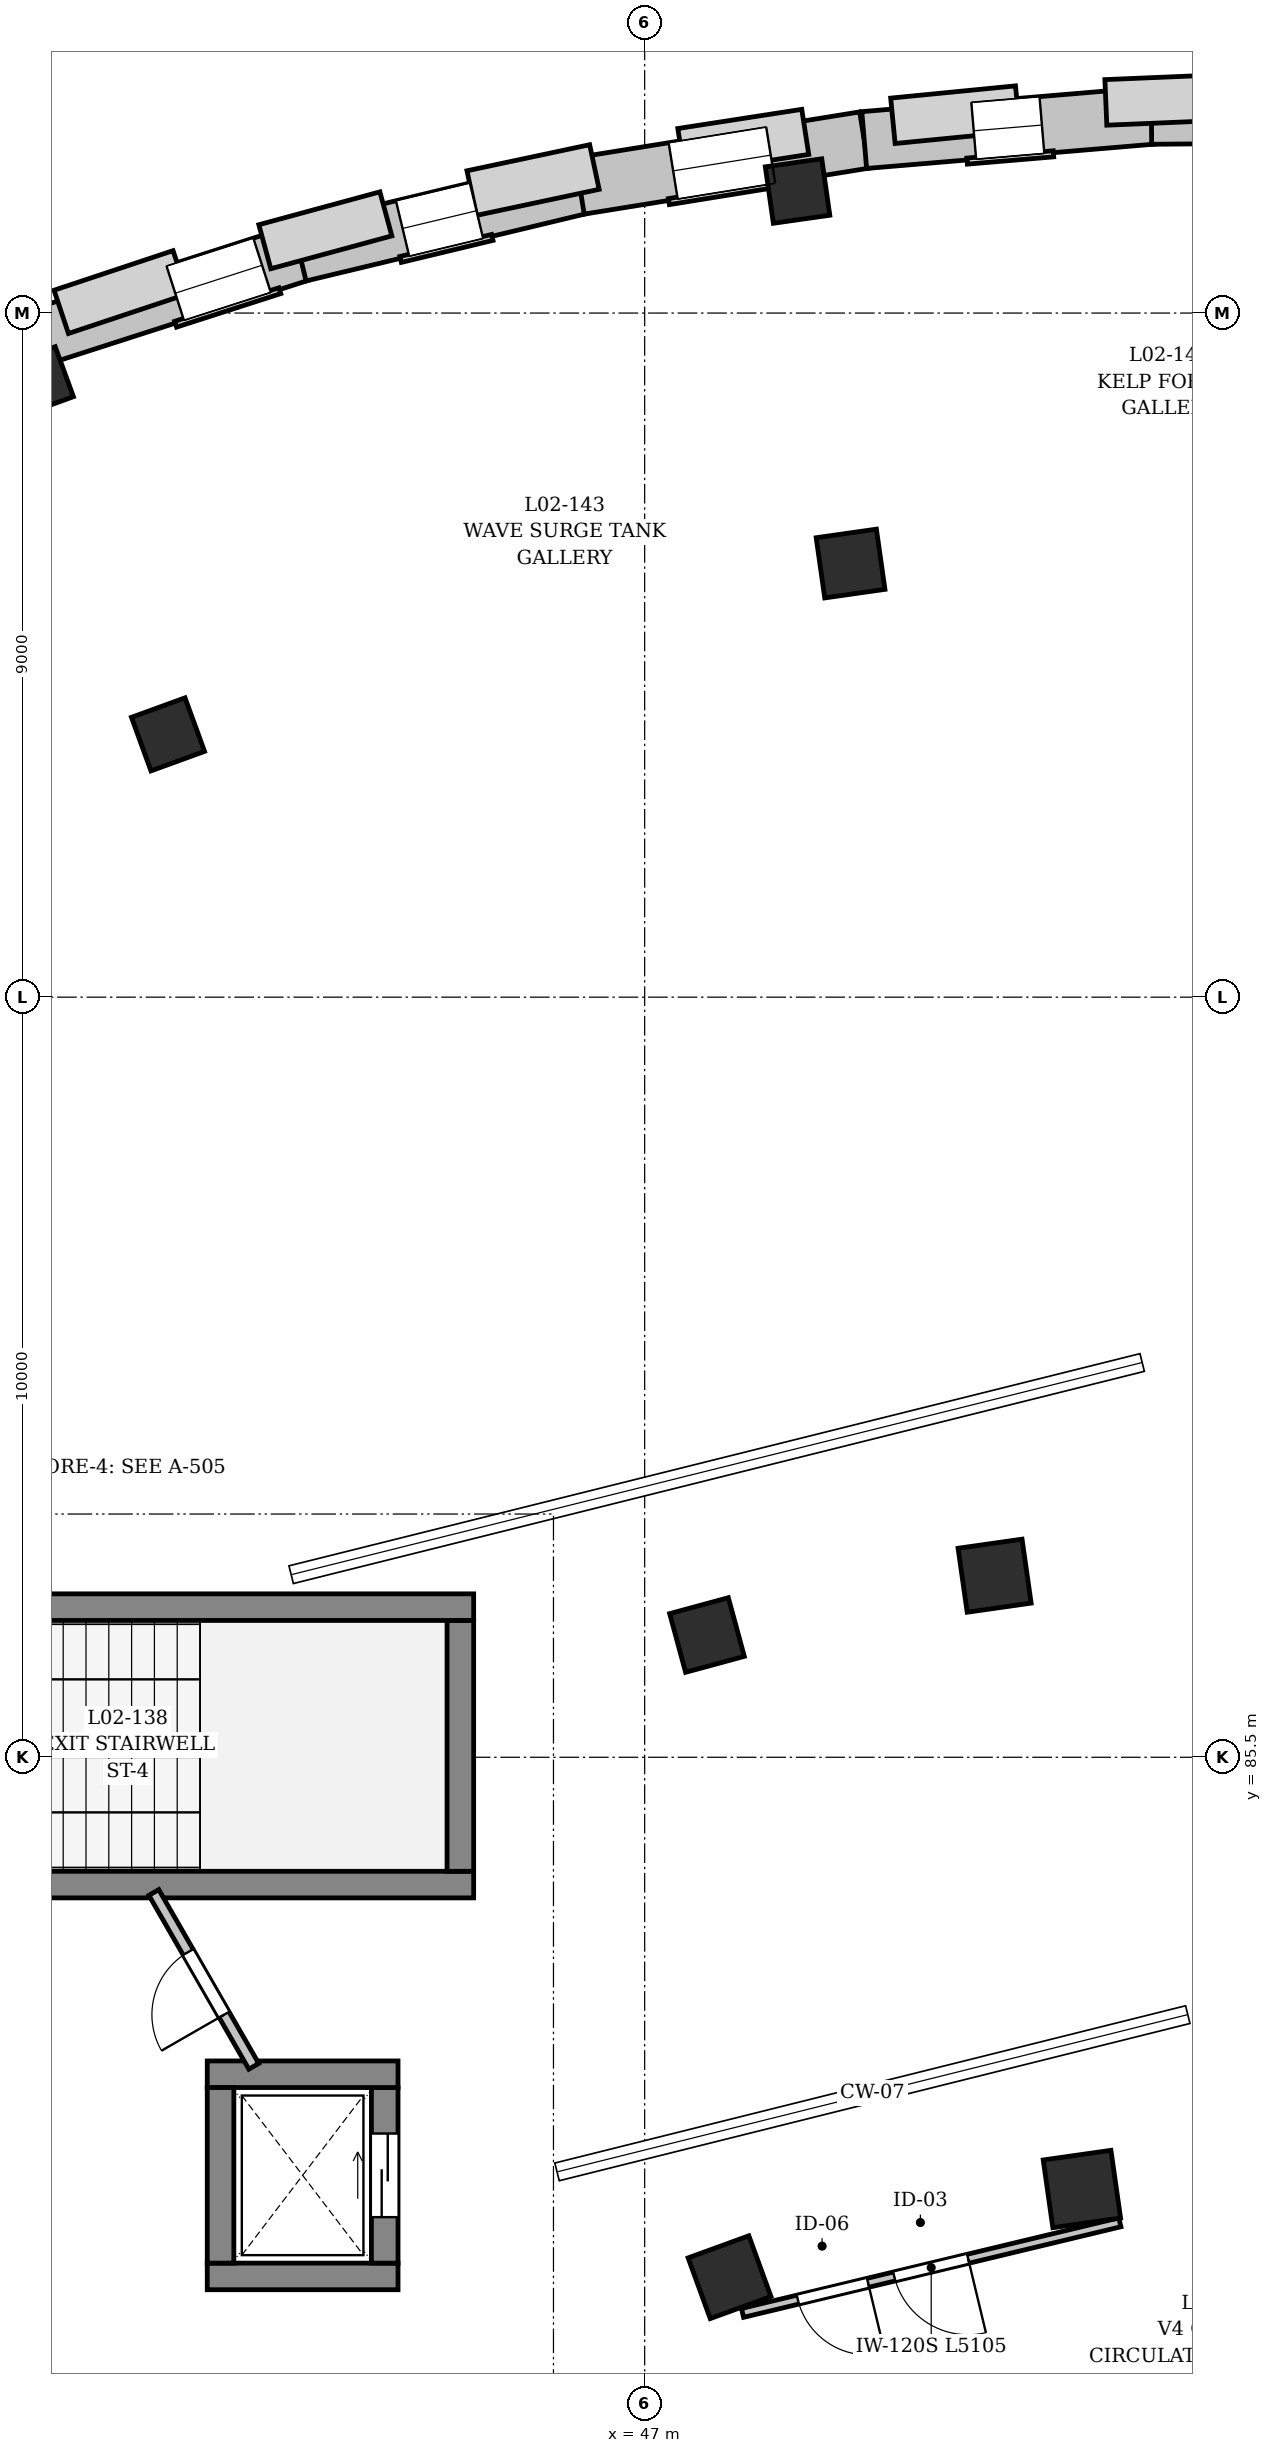
"""IFC4 building model, lengths in metres.
Left out: names, types, materials, properties, quantities, classifications, styles, units other than length and angle.
Written with IfcOpenShell. Run it as: python <this file> out.ifc"""

import sys

from ifc_helpers import new_model, si_unit, direction, frame, frame_2d, origin, origin_2d, place, context, subcontext, project, spatial, rectangle, extrude, element, fill, save


model = new_model("IFC4")
c1 = context("Model", 3, precision=1e-05, world=origin(), true_north=direction((0.0, 1.0)))
c2 = subcontext(c1, "Body", "Model", "MODEL_VIEW")
j1 = project(units=[si_unit("LENGTHUNIT", "METRE"), si_unit("PLANEANGLEUNIT", "RADIAN")], contexts=[c1])
p1 = place(None, origin())
s1 = spatial("IfcSite", under=j1, at=p1, CompositionType="ELEMENT")
p2 = place(p1, origin())
s2 = spatial("IfcBuilding", under=s1, at=p2, CompositionType="ELEMENT")
p3 = place(p2, frame((0.0, 0.0, 5.4)))
s3 = spatial("IfcBuildingStorey", under=s2, at=p3, CompositionType="ELEMENT", Elevation=5.4)
p4 = place(p3, frame((52.752, 79.82, 0.0), z_axis=(0.0, 0.0, 1.0), x_axis=(-0.140901231938, 0.990023657717, 0.0)))
e1 = element("IfcColumn", 1, at=p4, inside=s3, PredefinedType="COLUMN", context=c2, shape_type="SweptSolid", body=[
    extrude(rectangle(XDim=0.9, YDim=0.9, at=origin_2d()), origin(), (0.0, 0.0, 1.0), 4.5),
])
p5 = place(p3, frame((51.604, 87.889, 0.0), z_axis=(0.0, 0.0, 1.0), x_axis=(-0.140901231938, 0.990023657717, 0.0)))
e2 = element("IfcColumn", 2, at=p5, inside=s3, PredefinedType="COLUMN", context=c2, shape_type="SweptSolid", body=[
    extrude(rectangle(XDim=0.85, YDim=0.85, at=origin_2d()), origin(), (0.0, 0.0, 1.0), 4.5),
])
p6 = place(p3, frame((49.709, 101.205, 0.0), z_axis=(0.0, 0.0, 1.0), x_axis=(-0.140901231938, 0.990023657717, 0.0)))
e3 = element("IfcColumn", 3, at=p6, inside=s3, PredefinedType="COLUMN", context=c2, shape_type="SweptSolid", body=[
    extrude(rectangle(XDim=0.8, YDim=0.8, at=origin_2d()), origin(), (0.0, 0.0, 1.0), 4.5),
])
p7 = place(p3, frame((49.011, 106.105, 0.0), z_axis=(0.0, 0.0, 1.0), x_axis=(-0.140901231938, 0.990023657717, 0.0)))
e4 = element("IfcColumn", 4, at=p7, inside=s3, PredefinedType="COLUMN", context=c2, shape_type="SweptSolid", body=[
    extrude(rectangle(XDim=0.75, YDim=0.75, at=origin_2d()), origin(), (0.0, 0.0, 1.0), 4.5),
])
p8 = place(p3, frame((48.116, 78.66, 0.0), z_axis=(0.0, 0.0, 1.0), x_axis=(-0.342020143326, 0.939692620786, 0.0)))
e5 = element("IfcColumn", 5, at=p8, inside=s3, PredefinedType="COLUMN", context=c2, shape_type="SweptSolid", body=[
    extrude(rectangle(XDim=0.85, YDim=0.85, at=origin_2d()), origin(), (0.0, 0.0, 1.0), 4.5),
])
p9 = place(p3, frame((47.82, 87.108, 0.0), z_axis=(0.0, 0.0, 1.0), x_axis=(-0.262189178641, 0.965016494472, 0.0)))
e6 = element("IfcColumn", 6, at=p9, inside=s3, PredefinedType="COLUMN", context=c2, shape_type="SweptSolid", body=[
    extrude(rectangle(XDim=0.8, YDim=0.8, at=origin_2d()), origin(), (0.0, 0.0, 1.0), 4.5),
])
p10 = place(p3, frame((40.729, 98.957, 0.0), z_axis=(0.0, 0.0, 1.0), x_axis=(-0.342020143326, 0.939692620786, 0.0)))
e7 = element("IfcColumn", 7, at=p10, inside=s3, PredefinedType="COLUMN", context=c2, shape_type="SweptSolid", body=[
    extrude(rectangle(XDim=0.75, YDim=0.75, at=origin_2d()), origin(), (0.0, 0.0, 1.0), 4.5),
])
p11 = place(p3, frame((39.036, 103.609, 0.0), z_axis=(0.0, 0.0, 1.0), x_axis=(-0.342020143326, 0.939692620786, 0.0)))
e8 = element("IfcColumn", 8, at=p11, inside=s3, PredefinedType="COLUMN", context=c2, shape_type="SweptSolid", body=[
    extrude(rectangle(XDim=0.7, YDim=0.7, at=origin_2d()), origin(), (0.0, 0.0, 1.0), 4.5),
])
p12 = place(p3, frame((42.244, 70.923, 0.0), z_axis=(0.0, 0.0, 1.0), x_axis=(-0.719345409555, 0.694652561898, 0.0)))
e9 = element("IfcWall", 9, at=p12, inside=s3, PredefinedType="SOLIDWALL", context=c2, shape_type="SweptSolid", body=[
    extrude(rectangle(XDim=11.934, YDim=0.52, at=frame_2d((5.967, 0.0))), origin(), (0.0, 0.0, 1.0), 3.54),
])
p13 = place(p12, frame((4.072, 0.0, 0.9)))
e10 = element("IfcOpeningElement", 10, at=p13, cuts=e9, PredefinedType="OPENING", context=c2, shape_type="SweptSolid", body=[
    extrude(rectangle(XDim=1.75, YDim=1.85, at=frame_2d((0.875, 0.925))), frame((0.0, 0.27, 0.0), z_axis=(0.0, -1.0, 0.0), x_axis=(1.0, 0.0, 0.0)), (0.0, 0.0, 1.0), 0.54),
])
p14 = place(p12, frame((6.892, 0.0, 0.9)))
e11 = element("IfcOpeningElement", 11, at=p14, cuts=e9, PredefinedType="OPENING", context=c2, shape_type="SweptSolid", body=[
    extrude(rectangle(XDim=1.75, YDim=1.85, at=frame_2d((0.875, 0.925))), frame((0.0, 0.27, 0.0), z_axis=(0.0, -1.0, 0.0), x_axis=(1.0, 0.0, 0.0)), (0.0, 0.0, 1.0), 0.54),
])
p15 = place(p3, frame((38.848, 104.125, 0.0), z_axis=(0.0, 0.0, 1.0), x_axis=(0.951959535224, 0.306223845081, 0.0)))
e12 = element("IfcWall", 12, at=p15, inside=s3, PredefinedType="SOLIDWALL", context=c2, shape_type="SweptSolid", body=[
    extrude(rectangle(XDim=3.792, YDim=0.75, at=frame_2d((1.896, 0.0))), origin(), (0.0, 0.0, 1.0), 3.49),
])
p16 = place(p15, frame((2.076, 0.0, 0.75)))
e13 = element("IfcOpeningElement", 13, at=p16, cuts=e12, PredefinedType="OPENING", context=c2, shape_type="SweptSolid", body=[
    extrude(rectangle(XDim=1.2, YDim=2.2, at=frame_2d((0.6, 1.1))), frame((0.0, 0.385, 0.0), z_axis=(0.0, -1.0, 0.0), x_axis=(1.0, 0.0, 0.0)), (0.0, 0.0, 1.0), 0.77),
])
p17 = place(p3, frame((42.458, 105.287, 0.0), z_axis=(0.0, 0.0, 1.0), x_axis=(0.972368597745, 0.233450873033, 0.0)))
e14 = element("IfcWall", 14, at=p17, inside=s3, PredefinedType="SOLIDWALL", context=c2, shape_type="SweptSolid", body=[
    extrude(rectangle(XDim=3.792, YDim=0.75, at=frame_2d((1.896, 0.0))), origin(), (0.0, 0.0, 1.0), 4.5),
])
p18 = place(p17, frame((1.396, 0.0, 0.75)))
e15 = element("IfcOpeningElement", 15, at=p18, cuts=e14, PredefinedType="OPENING", context=c2, shape_type="SweptSolid", body=[
    extrude(rectangle(XDim=1.0, YDim=2.3, at=frame_2d((0.5, 1.15))), frame((0.0, 0.385, 0.0), z_axis=(0.0, -1.0, 0.0), x_axis=(1.0, 0.0, 0.0)), (0.0, 0.0, 1.0), 0.77),
])
p19 = place(p3, frame((46.145, 106.172, 0.0), z_axis=(0.0, 0.0, 1.0), x_axis=(0.987231650427, 0.159291143492, 0.0)))
e16 = element("IfcWall", 16, at=p19, inside=s3, PredefinedType="SOLIDWALL", context=c2, shape_type="SweptSolid", body=[
    extrude(rectangle(XDim=3.792, YDim=0.75, at=frame_2d((1.896, 0.0))), origin(), (0.0, 0.0, 1.0), 3.49),
])
p20 = place(p19, frame((1.246, 0.0, 0.75)))
e17 = element("IfcOpeningElement", 17, at=p20, cuts=e16, PredefinedType="OPENING", context=c2, shape_type="SweptSolid", body=[
    extrude(rectangle(XDim=1.3, YDim=2.2, at=frame_2d((0.65, 1.1))), frame((0.0, 0.385, 0.0), z_axis=(0.0, -1.0, 0.0), x_axis=(1.0, 0.0, 0.0)), (0.0, 0.0, 1.0), 0.77),
])
p21 = place(p3, frame((49.888, 106.776, 0.0), z_axis=(0.0, 0.0, 1.0), x_axis=(0.996442430759, 0.084276225487, 0.0)))
e18 = element("IfcWall", 18, at=p21, inside=s3, PredefinedType="SOLIDWALL", context=c2, shape_type="SweptSolid", body=[
    extrude(rectangle(XDim=3.792, YDim=0.75, at=frame_2d((1.896, 0.0))), origin(), (0.0, 0.0, 1.0), 4.5),
])
p22 = place(p21, frame((1.446, 0.0, 0.75)))
e19 = element("IfcOpeningElement", 19, at=p22, cuts=e18, PredefinedType="OPENING", context=c2, shape_type="SweptSolid", body=[
    extrude(rectangle(XDim=0.9, YDim=2.4, at=frame_2d((0.45, 1.2))), frame((0.0, 0.385, 0.0), z_axis=(0.0, -1.0, 0.0), x_axis=(1.0, 0.0, 0.0)), (0.0, 0.0, 1.0), 0.77),
])
p23 = place(p3, frame((53.667, 107.095, 0.0), z_axis=(0.0, 0.0, 1.0), x_axis=(0.999962224163, 0.008691964475, 0.0)))
e20 = element("IfcWall", 20, at=p23, inside=s3, PredefinedType="SOLIDWALL", context=c2, shape_type="SweptSolid", body=[
    extrude(rectangle(XDim=3.792, YDim=0.75, at=frame_2d((1.896, 0.0))), origin(), (0.0, 0.0, 1.0), 4.5),
])
p24 = place(p23, frame((1.346, 0.0, 0.75)))
e21 = element("IfcOpeningElement", 21, at=p24, cuts=e20, PredefinedType="OPENING", context=c2, shape_type="SweptSolid", body=[
    extrude(rectangle(XDim=1.1, YDim=2.4, at=frame_2d((0.55, 1.2))), frame((0.0, 0.385, 0.0), z_axis=(0.0, -1.0, 0.0), x_axis=(1.0, 0.0, 0.0)), (0.0, 0.0, 1.0), 0.77),
])
p25 = place(p3, frame((35.65, 83.825, 0.0), z_axis=(0.0, 0.0, 1.0), x_axis=(1.0, 0.0, 0.0)))
e22 = element("IfcWall", 22, at=p25, inside=s3, PredefinedType="SHEAR", context=c2, shape_type="SweptSolid", body=[
    extrude(rectangle(XDim=9.1, YDim=0.35, at=frame_2d((4.55, 0.0))), origin(), (0.0, 0.0, 1.0), 4.5),
])
p26 = place(p3, frame((44.575, 84.0, 0.0), z_axis=(0.0, 0.0, 1.0), x_axis=(0.0, 1.0, 0.0)))
e23 = element("IfcWall", 23, at=p26, inside=s3, PredefinedType="SHEAR", context=c2, shape_type="SweptSolid", body=[
    extrude(rectangle(XDim=3.3, YDim=0.35, at=frame_2d((1.65, 0.0))), origin(), (0.0, 0.0, 1.0), 4.5),
])
p27 = place(p3, frame((44.75, 87.475, 0.0), z_axis=(0.0, 0.0, 1.0), x_axis=(-1.0, 0.0, 0.0)))
e24 = element("IfcWall", 24, at=p27, inside=s3, PredefinedType="SHEAR", context=c2, shape_type="SweptSolid", body=[
    extrude(rectangle(XDim=9.1, YDim=0.35, at=frame_2d((4.55, 0.0))), origin(), (0.0, 0.0, 1.0), 4.5),
])
p28 = place(p3, frame((41.245, 78.67, 0.0), z_axis=(0.0, 0.0, 1.0), x_axis=(1.0, 0.0, 0.0)))
e25 = element("IfcWall", 25, at=p28, inside=s3, PredefinedType="SHEAR", context=c2, shape_type="SweptSolid", body=[
    extrude(rectangle(XDim=2.51, YDim=0.35, at=frame_2d((1.255, 0.0))), origin(), (0.0, 0.0, 1.0), 4.5),
])
p29 = place(p3, frame((43.58, 78.845, 0.0), z_axis=(0.0, 0.0, 1.0), x_axis=(0.0, 1.0, 0.0)))
e26 = element("IfcWall", 26, at=p29, inside=s3, PredefinedType="SHEAR", context=c2, shape_type="SweptSolid", body=[
    extrude(rectangle(XDim=2.31, YDim=0.35, at=frame_2d((1.155, 0.0))), origin(), (0.0, 0.0, 1.0), 4.5),
])
p30 = place(p29, frame((0.605, 0.0, 0.0)))
e27 = element("IfcOpeningElement", 27, at=p30, cuts=e26, PredefinedType="OPENING", context=c2, shape_type="SweptSolid", body=[
    extrude(rectangle(XDim=1.1, YDim=2.2, at=frame_2d((0.55, 1.1))), frame((0.0, 0.185, 0.0), z_axis=(0.0, -1.0, 0.0), x_axis=(1.0, 0.0, 0.0)), (0.0, 0.0, 1.0), 0.37),
])
p31 = place(p3, frame((43.755, 81.33, 0.0), z_axis=(0.0, 0.0, 1.0), x_axis=(-1.0, 0.0, 0.0)))
e28 = element("IfcWall", 28, at=p31, inside=s3, PredefinedType="SHEAR", context=c2, shape_type="SweptSolid", body=[
    extrude(rectangle(XDim=2.51, YDim=0.35, at=frame_2d((1.255, 0.0))), origin(), (0.0, 0.0, 1.0), 4.5),
])
p32 = place(p3, frame((41.42, 81.155, 0.0), z_axis=(0.0, 0.0, 1.0), x_axis=(0.0, -1.0, 0.0)))
e29 = element("IfcWall", 29, at=p32, inside=s3, PredefinedType="SHEAR", context=c2, shape_type="SweptSolid", body=[
    extrude(rectangle(XDim=2.31, YDim=0.35, at=frame_2d((1.155, 0.0))), origin(), (0.0, 0.0, 1.0), 4.5),
])
p33 = place(p3, frame((53.252, 79.382, 0.0), z_axis=(0.0, 0.0, 1.0), x_axis=(-0.972378185718, -0.233410933633, 0.0)))
e30 = element("IfcWall", 30, at=p33, inside=s3, PredefinedType="PARTITIONING", context=c2, shape_type="SweptSolid", body=[
    extrude(rectangle(XDim=5.105, YDim=0.12, at=frame_2d((2.553, 0.0))), origin(), (0.0, 0.0, 1.0), 3.49),
])
p34 = place(p33, frame((2.053, 0.0, 0.0)))
e31 = element("IfcOpeningElement", 31, at=p34, cuts=e30, PredefinedType="OPENING", context=c2, shape_type="SweptSolid", body=[
    extrude(rectangle(XDim=1.0, YDim=2.2, at=frame_2d((0.5, 1.1))), frame((0.0, 0.07, 0.0), z_axis=(0.0, -1.0, 0.0), x_axis=(1.0, 0.0, 0.0)), (0.0, 0.0, 1.0), 0.14),
])
p35 = place(p33, frame((3.407, 0.0, 0.0)))
e32 = element("IfcOpeningElement", 32, at=p35, cuts=e30, PredefinedType="OPENING", context=c2, shape_type="SweptSolid", body=[
    extrude(rectangle(XDim=0.95, YDim=2.2, at=frame_2d((0.475, 1.1))), frame((0.0, 0.07, 0.0), z_axis=(0.0, -1.0, 0.0), x_axis=(1.0, 0.0, 0.0)), (0.0, 0.0, 1.0), 0.14),
])
p36 = place(p3, frame((41.857, 81.434, 0.0), z_axis=(0.0, 0.0, 1.0), x_axis=(-0.49846938543, 0.866907302882, 0.0)))
e33 = element("IfcWall", 33, at=p36, inside=s3, PredefinedType="PARTITIONING", context=c2, shape_type="SweptSolid", body=[
    extrude(rectangle(XDim=2.638, YDim=0.15, at=frame_2d((1.319, 0.0))), origin(), (0.0, 0.0, 1.0), 4.5),
])
p37 = place(p36, frame((0.783, 0.0, 0.0)))
e34 = element("IfcOpeningElement", 34, at=p37, cuts=e33, PredefinedType="OPENING", context=c2, shape_type="SweptSolid", body=[
    extrude(rectangle(XDim=0.95, YDim=2.2, at=frame_2d((0.475, 1.1))), frame((0.0, 0.085, 0.0), z_axis=(0.0, -1.0, 0.0), x_axis=(1.0, 0.0, 0.0)), (0.0, 0.0, 1.0), 0.17),
])
p38 = place(p16, origin())
e35 = element("IfcWindow", 35, at=p38, inside=s3, PartitioningType="DOUBLE_PANEL_VERTICAL", PredefinedType="WINDOW", context=c2, shape_type="SweptSolid", body=[
    extrude(rectangle(XDim=1.2, YDim=2.2, at=frame_2d((0.6, 1.1))), frame((0.0, 0.03, 0.0), z_axis=(0.0, -1.0, 0.0), x_axis=(1.0, 0.0, 0.0)), (0.0, 0.0, 1.0), 0.06),
])
fill(e13, e35)
p39 = place(p18, origin())
e36 = element("IfcWindow", 36, at=p39, inside=s3, PartitioningType="SINGLE_PANEL", PredefinedType="WINDOW", context=c2, shape_type="SweptSolid", body=[
    extrude(rectangle(XDim=1.0, YDim=2.3, at=frame_2d((0.5, 1.15))), frame((0.0, 0.03, 0.0), z_axis=(0.0, -1.0, 0.0), x_axis=(1.0, 0.0, 0.0)), (0.0, 0.0, 1.0), 0.06),
])
fill(e15, e36)
p40 = place(p20, origin())
e37 = element("IfcWindow", 37, at=p40, inside=s3, PartitioningType="DOUBLE_PANEL_VERTICAL", PredefinedType="WINDOW", context=c2, shape_type="SweptSolid", body=[
    extrude(rectangle(XDim=1.3, YDim=2.2, at=frame_2d((0.65, 1.1))), frame((0.0, 0.03, 0.0), z_axis=(0.0, -1.0, 0.0), x_axis=(1.0, 0.0, 0.0)), (0.0, 0.0, 1.0), 0.06),
])
fill(e17, e37)
p41 = place(p22, origin())
e38 = element("IfcWindow", 38, at=p41, inside=s3, PartitioningType="SINGLE_PANEL", PredefinedType="WINDOW", context=c2, shape_type="SweptSolid", body=[
    extrude(rectangle(XDim=0.9, YDim=2.4, at=frame_2d((0.45, 1.2))), frame((0.0, 0.03, 0.0), z_axis=(0.0, -1.0, 0.0), x_axis=(1.0, 0.0, 0.0)), (0.0, 0.0, 1.0), 0.06),
])
fill(e19, e38)
p42 = place(p30, origin())
e39 = element("IfcDoor", 39, at=p42, inside=s3, OperationType="SLIDING_TO_LEFT", PredefinedType="DOOR", context=c2, shape_type="SweptSolid", body=[
    extrude(rectangle(XDim=1.1, YDim=2.2, at=frame_2d((0.55, 1.1))), frame((0.0, 0.025, 0.0), z_axis=(0.0, -1.0, 0.0), x_axis=(1.0, 0.0, 0.0)), (0.0, 0.0, 1.0), 0.05),
])
fill(e27, e39)
p43 = place(p34, origin())
e40 = element("IfcDoor", 40, at=p43, inside=s3, OperationType="SINGLE_SWING_LEFT", PredefinedType="DOOR", context=c2, shape_type="SweptSolid", body=[
    extrude(rectangle(XDim=1.0, YDim=2.2, at=frame_2d((0.5, 1.1))), frame((0.0, 0.025, 0.0), z_axis=(0.0, -1.0, 0.0), x_axis=(1.0, 0.0, 0.0)), (0.0, 0.0, 1.0), 0.05),
])
fill(e31, e40)
p44 = place(p37, origin())
e41 = element("IfcDoor", 41, at=p44, inside=s3, OperationType="SINGLE_SWING_RIGHT", PredefinedType="DOOR", context=c2, shape_type="SweptSolid", body=[
    extrude(rectangle(XDim=0.95, YDim=2.2, at=frame_2d((0.475, 1.1))), frame((0.0, 0.025, 0.0), z_axis=(0.0, -1.0, 0.0), x_axis=(1.0, 0.0, 0.0)), (0.0, 0.0, 1.0), 0.05),
])
fill(e34, e41)
p45 = place(p35, origin())
e42 = element("IfcDoor", 42, at=p45, inside=s3, OperationType="SINGLE_SWING_RIGHT", PredefinedType="DOOR", context=c2, shape_type="SweptSolid", body=[
    extrude(rectangle(XDim=0.95, YDim=2.2, at=frame_2d((0.475, 1.1))), frame((0.0, 0.025, 0.0), z_axis=(0.0, -1.0, 0.0), x_axis=(1.0, 0.0, 0.0)), (0.0, 0.0, 1.0), 0.05),
])
fill(e32, e42)
save(model, sys.argv[1])
